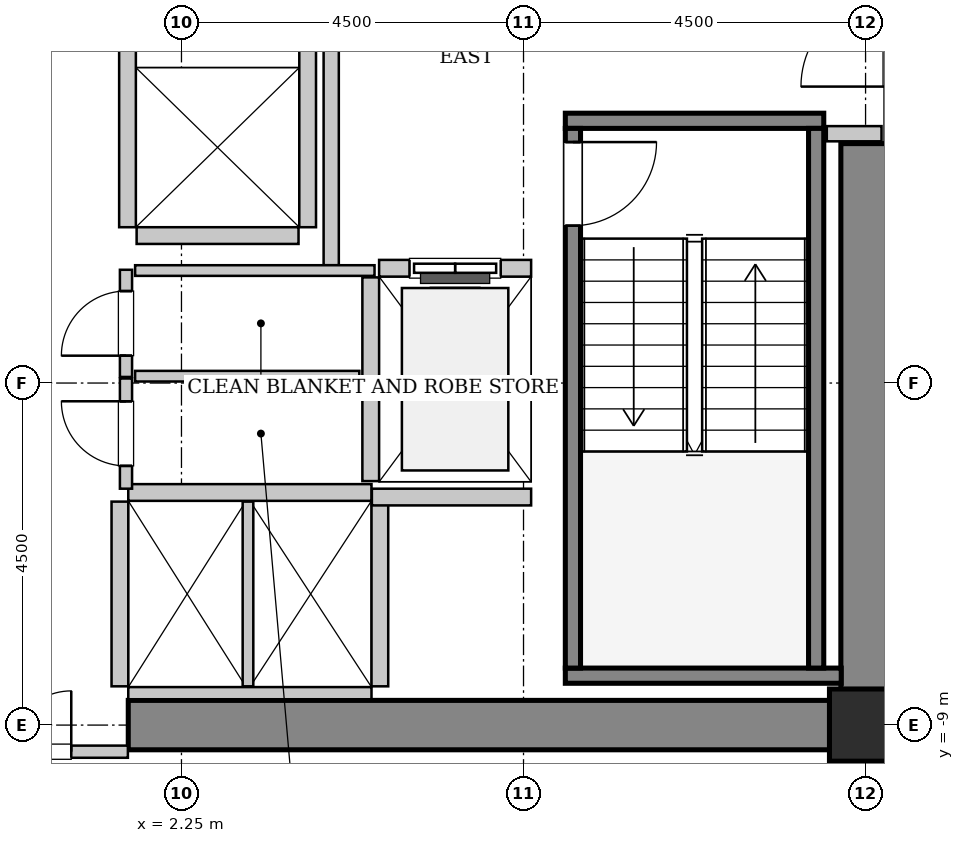
"""IFC4 building model, lengths in metres.
Left out: names, types, materials, properties, quantities, classifications, styles, units other than length and angle.
Written with IfcOpenShell. Run it as: python <this file> out.ifc"""

import sys

from ifc_helpers import new_model, si_unit, direction, frame, frame_2d, origin, origin_2d, place, context, subcontext, project, spatial, rectangle, hollow_rectangle, extrude, source, transform, mapped, element, fill, save


model = new_model("IFC4")
c1 = context("Model", 3, precision=1e-05, world=origin(), true_north=direction((0.0, 1.0)))
c2 = subcontext(c1, "Body", "Model", "MODEL_VIEW")
j1 = project(units=[si_unit("LENGTHUNIT", "METRE"), si_unit("PLANEANGLEUNIT", "RADIAN")], contexts=[c1])
p1 = place(None, origin())
s1 = spatial("IfcSite", under=j1, at=p1, CompositionType="ELEMENT")
p2 = place(p1, origin())
s2 = spatial("IfcBuilding", under=s1, at=p2, CompositionType="ELEMENT")
p3 = place(p2, frame((0.0, 0.0, 55.8)))
s3 = spatial("IfcBuildingStorey", under=s2, at=p3, CompositionType="ELEMENT", Elevation=55.8)
m1 = source(origin(), c2, "Body", "SweptSolid", [
    extrude(rectangle(XDim=10.025, YDim=0.65, at=frame_2d((5.012, 0.0))), origin(), (0.0, 0.0, 1.0), 3.8),
])
p4 = place(p3, frame((1.55, -9.0, 0.0), z_axis=(0.0, 0.0, 1.0), x_axis=(1.0, 0.0, 0.0)))
e1 = element("IfcWall", 1, at=p4, inside=s3, PredefinedType="SHEAR", context=c2, shape_type="MappedRepresentation", body=[
    mapped(m1, transform((0.0, 0.0, 0.0), x_axis=(1.0, 0.0, 0.0), y_axis=(0.0, 1.0, 0.0), z_axis=(0.0, 0.0, 1.0), scale=1.0)),
])
m2 = source(origin(), c2, "Body", "SweptSolid", [
    extrude(rectangle(XDim=7.325, YDim=0.65, at=frame_2d((3.663, 0.0))), origin(), (0.0, 0.0, 1.0), 3.8),
])
p5 = place(p3, frame((11.25, -8.675, 0.0), z_axis=(0.0, 0.0, 1.0), x_axis=(0.0, 1.0, 0.0)))
e2 = element("IfcWall", 2, at=p5, inside=s3, PredefinedType="SHEAR", context=c2, shape_type="MappedRepresentation", body=[
    mapped(m2, transform((0.0, 0.0, 0.0), x_axis=(1.0, 0.0, 0.0), y_axis=(0.0, 1.0, 0.0), z_axis=(0.0, 0.0, 1.0), scale=1.0)),
])
m3 = source(origin(), c2, "Body", "SweptSolid", [
    extrude(hollow_rectangle(XDim=0.95, YDim=0.95, WallThickness=0.045, InnerFilletRadius=0.045, OuterFilletRadius=0.09, at=origin_2d()), origin(), (0.0, 0.0, 1.0), 3.8),
])
p6 = place(p3, frame((11.25, -9.0, 0.0), z_axis=(0.0, 0.0, 1.0), x_axis=(1.0, 0.0, 0.0)))
e3 = element("IfcColumn", 3, at=p6, inside=s3, PredefinedType="COLUMN", context=c2, shape_type="MappedRepresentation", body=[
    mapped(m3, transform((0.0, 0.0, 0.0), x_axis=(1.0, 0.0, 0.0), y_axis=(0.0, 1.0, 0.0), z_axis=(0.0, 0.0, 1.0), scale=1.0)),
])
m4 = source(origin(), c2, "Body", "SweptSolid", [
    extrude(rectangle(XDim=3.4, YDim=0.2, at=frame_2d((1.7, 0.0))), origin(), (0.0, 0.0, 1.0), 3.8),
])
p7 = place(p3, frame((7.3, -1.05, 0.0), z_axis=(0.0, 0.0, 1.0), x_axis=(1.0, 0.0, 0.0)))
e4 = element("IfcWall", 4, at=p7, inside=s3, PredefinedType="SOLIDWALL", context=c2, shape_type="MappedRepresentation", body=[
    mapped(m4, transform((0.0, 0.0, 0.0), x_axis=(1.0, 0.0, 0.0), y_axis=(0.0, 1.0, 0.0), z_axis=(0.0, 0.0, 1.0), scale=1.0)),
])
m5 = source(origin(), c2, "Body", "SweptSolid", [
    extrude(rectangle(XDim=3.63, YDim=0.2, at=frame_2d((1.815, 0.0))), origin(), (0.0, 0.0, 1.0), 3.8),
])
p8 = place(p3, frame((7.3, -8.35, 0.0), z_axis=(0.0, 0.0, 1.0), x_axis=(1.0, 0.0, 0.0)))
e5 = element("IfcWall", 5, at=p8, inside=s3, PredefinedType="SOLIDWALL", context=c2, shape_type="MappedRepresentation", body=[
    mapped(m5, transform((0.0, 0.0, 0.0), x_axis=(1.0, 0.0, 0.0), y_axis=(0.0, 1.0, 0.0), z_axis=(0.0, 0.0, 1.0), scale=1.0)),
])
m6 = source(origin(), c2, "Body", "SweptSolid", [
    extrude(rectangle(XDim=7.1, YDim=0.2, at=frame_2d((3.55, 0.0))), origin(), (0.0, 0.0, 1.0), 3.8),
])
p9 = place(p3, frame((7.4, -1.15, 0.0), z_axis=(0.0, 0.0, 1.0), x_axis=(0.0, -1.0, 0.0)))
e6 = element("IfcWall", 6, at=p9, inside=s3, PredefinedType="SOLIDWALL", context=c2, shape_type="MappedRepresentation", body=[
    mapped(m6, transform((0.0, 0.0, 0.0), x_axis=(1.0, 0.0, 0.0), y_axis=(0.0, 1.0, 0.0), z_axis=(0.0, 0.0, 1.0), scale=1.0)),
])
p10 = place(p9, frame((0.18, 0.0, 0.0)))
e7 = element("IfcOpeningElement", 7, at=p10, cuts=e6, PredefinedType="OPENING", context=c2, shape_type="SweptSolid", body=[
    extrude(rectangle(XDim=1.1, YDim=2.15, at=frame_2d((0.55, 1.075))), frame((0.0, 0.11, 0.0), z_axis=(0.0, -1.0, 0.0), x_axis=(1.0, 0.0, 0.0)), (0.0, 0.0, 1.0), 0.22),
])
p11 = place(p3, frame((10.6, -1.15, 0.0), z_axis=(0.0, 0.0, 1.0), x_axis=(0.0, -1.0, 0.0)))
e8 = element("IfcWall", 8, at=p11, inside=s3, PredefinedType="SOLIDWALL", context=c2, shape_type="MappedRepresentation", body=[
    mapped(m6, transform((0.0, 0.0, 0.0), x_axis=(1.0, 0.0, 0.0), y_axis=(0.0, 1.0, 0.0), z_axis=(0.0, 0.0, 1.0), scale=1.0)),
])
m7 = source(origin(), c2, "Body", "SweptSolid", [
    extrude(rectangle(XDim=2.0, YDim=0.22, at=frame_2d((1.0, 0.0))), origin(), (0.0, 0.0, 1.0), 3.535),
])
p12 = place(p3, frame((6.85, -2.99, 0.0), z_axis=(0.0, 0.0, 1.0), x_axis=(-1.0, 0.0, 0.0)))
e9 = element("IfcWall", 9, at=p12, inside=s3, PredefinedType="SOLIDWALL", context=c2, shape_type="MappedRepresentation", body=[
    mapped(m7, transform((0.0, 0.0, 0.0), x_axis=(1.0, 0.0, 0.0), y_axis=(0.0, 1.0, 0.0), z_axis=(0.0, 0.0, 1.0), scale=1.0)),
])
p13 = place(p12, frame((0.4, 0.0, 0.0)))
e10 = element("IfcOpeningElement", 10, at=p13, cuts=e9, PredefinedType="OPENING", context=c2, shape_type="SweptSolid", body=[
    extrude(rectangle(XDim=1.2, YDim=2.2, at=frame_2d((0.6, 1.1))), frame((0.0, 0.12, 0.0), z_axis=(0.0, -1.0, 0.0), x_axis=(1.0, 0.0, 0.0)), (0.0, 0.0, 1.0), 0.24),
])
m8 = source(origin(), c2, "Body", "SweptSolid", [
    extrude(rectangle(XDim=2.68, YDim=0.22, at=frame_2d((1.34, 0.0))), origin(), (0.0, 0.0, 1.0), 3.535),
])
p14 = place(p3, frame((4.74, -3.11, 0.0), z_axis=(0.0, 0.0, 1.0), x_axis=(0.0, -1.0, 0.0)))
e11 = element("IfcWall", 11, at=p14, inside=s3, PredefinedType="SOLIDWALL", context=c2, shape_type="MappedRepresentation", body=[
    mapped(m8, transform((0.0, 0.0, 0.0), x_axis=(1.0, 0.0, 0.0), y_axis=(0.0, 1.0, 0.0), z_axis=(0.0, 0.0, 1.0), scale=1.0)),
])
m9 = source(origin(), c2, "Body", "SweptSolid", [
    extrude(rectangle(XDim=3.2, YDim=0.22, at=frame_2d((1.6, 0.0))), origin(), (0.0, 0.0, 1.0), 3.535),
])
p15 = place(p3, frame((4.75, -5.94, 0.0), z_axis=(0.0, 0.0, 1.0), x_axis=(-1.0, 0.0, 0.0)))
e12 = element("IfcWall", 12, at=p15, inside=s3, PredefinedType="SOLIDWALL", context=c2, shape_type="MappedRepresentation", body=[
    mapped(m9, transform((0.0, 0.0, 0.0), x_axis=(1.0, 0.0, 0.0), y_axis=(0.0, 1.0, 0.0), z_axis=(0.0, 0.0, 1.0), scale=1.0)),
])
m10 = source(origin(), c2, "Body", "SweptSolid", [
    extrude(rectangle(XDim=3.2, YDim=0.16, at=frame_2d((1.6, 0.0))), origin(), (0.0, 0.0, 1.0), 2.425),
])
p16 = place(p3, frame((1.55, -8.58, 0.0), z_axis=(0.0, 0.0, 1.0), x_axis=(1.0, 0.0, 0.0)))
e13 = element("IfcWall", 13, at=p16, inside=s3, PredefinedType="PARTITIONING", context=c2, shape_type="MappedRepresentation", body=[
    mapped(m10, transform((0.0, 0.0, 0.0), x_axis=(1.0, 0.0, 0.0), y_axis=(0.0, 1.0, 0.0), z_axis=(0.0, 0.0, 1.0), scale=1.0)),
])
m11 = source(origin(), c2, "Body", "SweptSolid", [
    extrude(rectangle(XDim=2.43, YDim=0.22, at=frame_2d((1.215, 0.0))), origin(), (0.0, 0.0, 1.0), 3.535),
])
p17 = place(p3, frame((1.44, -6.06, 0.0), z_axis=(0.0, 0.0, 1.0), x_axis=(0.0, -1.0, 0.0)))
e14 = element("IfcWall", 14, at=p17, inside=s3, PredefinedType="SOLIDWALL", context=c2, shape_type="MappedRepresentation", body=[
    mapped(m11, transform((0.0, 0.0, 0.0), x_axis=(1.0, 0.0, 0.0), y_axis=(0.0, 1.0, 0.0), z_axis=(0.0, 0.0, 1.0), scale=1.0)),
])
m12 = source(origin(), c2, "Body", "SweptSolid", [
    extrude(rectangle(XDim=2.43, YDim=0.14, at=frame_2d((1.215, 0.0))), origin(), (0.0, 0.0, 1.0), 3.535),
])
p18 = place(p3, frame((3.125, -8.49, 0.0), z_axis=(0.0, 0.0, 1.0), x_axis=(0.0, 1.0, 0.0)))
e15 = element("IfcWall", 15, at=p18, inside=s3, PredefinedType="PARTITIONING", context=c2, shape_type="MappedRepresentation", body=[
    mapped(m12, transform((0.0, 0.0, 0.0), x_axis=(1.0, 0.0, 0.0), y_axis=(0.0, 1.0, 0.0), z_axis=(0.0, 0.0, 1.0), scale=1.0)),
])
p19 = place(p3, frame((4.86, -8.49, 0.0), z_axis=(0.0, 0.0, 1.0), x_axis=(0.0, 1.0, 0.0)))
e16 = element("IfcWall", 16, at=p19, inside=s3, PredefinedType="SOLIDWALL", context=c2, shape_type="MappedRepresentation", body=[
    mapped(m11, transform((0.0, 0.0, 0.0), x_axis=(1.0, 0.0, 0.0), y_axis=(0.0, 1.0, 0.0), z_axis=(0.0, 0.0, 1.0), scale=1.0)),
])
m13 = source(origin(), c2, "Body", "SweptSolid", [
    extrude(rectangle(XDim=4.9, YDim=0.22, at=frame_2d((2.45, 0.0))), origin(), (0.0, 0.0, 1.0), 3.535),
])
for number, where, z_axis, x_axis in (
    (17, (1.54, 2.45, 0.0), (0.0, 0.0, 1.0), (0.0, -1.0, 0.0)),
    (18, (3.91, -2.45, 0.0), (0.0, 0.0, 1.0), (0.0, 1.0, 0.0)),
):
    element("IfcWall", number, at=place(p3, frame(where, z_axis=z_axis, x_axis=x_axis)), inside=s3, PredefinedType="SOLIDWALL", context=c2, shape_type="MappedRepresentation", body=[
        mapped(m13, transform((0.0, 0.0, 0.0), x_axis=(1.0, 0.0, 0.0), y_axis=(0.0, 1.0, 0.0), z_axis=(0.0, 0.0, 1.0), scale=1.0)),
    ])
m14 = source(origin(), c2, "Body", "SweptSolid", [
    extrude(rectangle(XDim=2.13, YDim=0.22, at=frame_2d((1.065, 0.0))), origin(), (0.0, 0.0, 1.0), 3.535),
])
p20 = place(p3, frame((1.66, -2.56, 0.0), z_axis=(0.0, 0.0, 1.0), x_axis=(1.0, 0.0, 0.0)))
e19 = element("IfcWall", 19, at=p20, inside=s3, PredefinedType="SOLIDWALL", context=c2, shape_type="MappedRepresentation", body=[
    mapped(m14, transform((0.0, 0.0, 0.0), x_axis=(1.0, 0.0, 0.0), y_axis=(0.0, 1.0, 0.0), z_axis=(0.0, 0.0, 1.0), scale=1.0)),
])
m15 = source(origin(), c2, "Body", "SweptSolid", [
    extrude(rectangle(XDim=2.095, YDim=0.22, at=frame_2d((1.048, 0.0))), origin(), (0.0, 0.0, 1.0), 3.535),
])
p21 = place(p3, frame((4.755, -6.0, 0.0), z_axis=(0.0, 0.0, 1.0), x_axis=(1.0, 0.0, 0.0)))
e20 = element("IfcWall", 20, at=p21, inside=s3, PredefinedType="SOLIDWALL", context=c2, shape_type="MappedRepresentation", body=[
    mapped(m15, transform((0.0, 0.0, 0.0), x_axis=(1.0, 0.0, 0.0), y_axis=(0.0, 1.0, 0.0), z_axis=(0.0, 0.0, 1.0), scale=1.0)),
])
m16 = source(origin(), c2, "Body", "SweptSolid", [
    extrude(rectangle(XDim=5.9, YDim=0.2, at=frame_2d((2.95, 0.0))), origin(), (0.0, 0.0, 1.0), 3.535),
])
p22 = place(p3, frame((4.22, -2.95, 0.0), z_axis=(0.0, 0.0, 1.0), x_axis=(0.0, 1.0, 0.0)))
e21 = element("IfcWall", 21, at=p22, inside=s3, PredefinedType="PARTITIONING", context=c2, shape_type="MappedRepresentation", body=[
    mapped(m16, transform((0.0, 0.0, 0.0), x_axis=(1.0, 0.0, 0.0), y_axis=(0.0, 1.0, 0.0), z_axis=(0.0, 0.0, 1.0), scale=1.0)),
])
m17 = source(origin(), c2, "Body", "SweptSolid", [
    extrude(rectangle(XDim=0.72, YDim=0.2, at=frame_2d((0.36, 0.0))), origin(), (0.0, 0.0, 1.0), 3.535),
])
p23 = place(p3, frame((10.74, -1.22, 0.0), z_axis=(0.0, 0.0, 1.0), x_axis=(1.0, 0.0, 0.0)))
e22 = element("IfcWall", 22, at=p23, inside=s3, PredefinedType="PARTITIONING", context=c2, shape_type="MappedRepresentation", body=[
    mapped(m17, transform((0.0, 0.0, 0.0), x_axis=(1.0, 0.0, 0.0), y_axis=(0.0, 1.0, 0.0), z_axis=(0.0, 0.0, 1.0), scale=1.0)),
])
m18 = source(origin(), c2, "Body", "SweptSolid", [
    extrude(rectangle(XDim=3.09, YDim=0.16, at=frame_2d((1.545, 0.0))), origin(), (0.0, 0.0, 1.0), 2.425),
])
p24 = place(p3, frame((-1.545, -9.35, 0.0), z_axis=(0.0, 0.0, 1.0), x_axis=(1.0, 0.0, 0.0)))
e23 = element("IfcWall", 23, at=p24, inside=s3, PredefinedType="PARTITIONING", context=c2, shape_type="MappedRepresentation", body=[
    mapped(m18, transform((0.0, 0.0, 0.0), x_axis=(1.0, 0.0, 0.0), y_axis=(0.0, 1.0, 0.0), z_axis=(0.0, 0.0, 1.0), scale=1.0)),
])
p25 = place(p24, frame((0.745, 0.0, 0.0)))
e24 = element("IfcOpeningElement", 24, at=p25, cuts=e23, PredefinedType="OPENING", context=c2, shape_type="SweptSolid", body=[
    extrude(rectangle(XDim=1.6, YDim=2.3, at=frame_2d((0.8, 1.15))), frame((0.0, 0.09, 0.0), z_axis=(0.0, -1.0, 0.0), x_axis=(1.0, 0.0, 0.0)), (0.0, 0.0, 1.0), 0.18),
])
m19 = source(origin(), c2, "Body", "SweptSolid", [
    extrude(rectangle(XDim=1.41, YDim=0.16, at=frame_2d((0.705, 0.0))), origin(), (0.0, 0.0, 1.0), 3.535),
])
p26 = place(p3, frame((1.52, -4.42, 0.0), z_axis=(0.0, 0.0, 1.0), x_axis=(0.0, 1.0, 0.0)))
e25 = element("IfcWall", 25, at=p26, inside=s3, PredefinedType="PARTITIONING", context=c2, shape_type="MappedRepresentation", body=[
    mapped(m19, transform((0.0, 0.0, 0.0), x_axis=(1.0, 0.0, 0.0), y_axis=(0.0, 1.0, 0.0), z_axis=(0.0, 0.0, 1.0), scale=1.0)),
])
p27 = place(p26, frame((0.28, 0.0, 0.0)))
e26 = element("IfcOpeningElement", 26, at=p27, cuts=e25, PredefinedType="OPENING", context=c2, shape_type="SweptSolid", body=[
    extrude(rectangle(XDim=0.85, YDim=2.1, at=frame_2d((0.425, 1.05))), frame((0.0, 0.09, 0.0), z_axis=(0.0, -1.0, 0.0), x_axis=(1.0, 0.0, 0.0)), (0.0, 0.0, 1.0), 0.18),
])
m20 = source(origin(), c2, "Body", "SweptSolid", [
    extrude(rectangle(XDim=3.15, YDim=0.14, at=frame_2d((1.575, 0.0))), origin(), (0.0, 0.0, 1.0), 3.535),
])
p28 = place(p3, frame((1.64, -3.02, 0.0), z_axis=(0.0, 0.0, 1.0), x_axis=(1.0, 0.0, 0.0)))
e27 = element("IfcWall", 27, at=p28, inside=s3, PredefinedType="PARTITIONING", context=c2, shape_type="MappedRepresentation", body=[
    mapped(m20, transform((0.0, 0.0, 0.0), x_axis=(1.0, 0.0, 0.0), y_axis=(0.0, 1.0, 0.0), z_axis=(0.0, 0.0, 1.0), scale=1.0)),
])
m21 = source(origin(), c2, "Body", "SweptSolid", [
    extrude(rectangle(XDim=2.95, YDim=0.14, at=frame_2d((1.475, 0.0))), origin(), (0.0, 0.0, 1.0), 3.535),
])
p29 = place(p3, frame((1.64, -4.41, 0.0), z_axis=(0.0, 0.0, 1.0), x_axis=(1.0, 0.0, 0.0)))
e28 = element("IfcWall", 28, at=p29, inside=s3, PredefinedType="PARTITIONING", context=c2, shape_type="MappedRepresentation", body=[
    mapped(m21, transform((0.0, 0.0, 0.0), x_axis=(1.0, 0.0, 0.0), y_axis=(0.0, 1.0, 0.0), z_axis=(0.0, 0.0, 1.0), scale=1.0)),
])
m22 = source(origin(), c2, "Body", "SweptSolid", [
    extrude(rectangle(XDim=1.45, YDim=0.16, at=frame_2d((0.725, 0.0))), origin(), (0.0, 0.0, 1.0), 3.535),
])
p30 = place(p3, frame((1.52, -5.89, 0.0), z_axis=(0.0, 0.0, 1.0), x_axis=(0.0, 1.0, 0.0)))
e29 = element("IfcWall", 29, at=p30, inside=s3, PredefinedType="PARTITIONING", context=c2, shape_type="MappedRepresentation", body=[
    mapped(m22, transform((0.0, 0.0, 0.0), x_axis=(1.0, 0.0, 0.0), y_axis=(0.0, 1.0, 0.0), z_axis=(0.0, 0.0, 1.0), scale=1.0)),
])
p31 = place(p30, frame((0.3, 0.0, 0.0)))
e30 = element("IfcOpeningElement", 30, at=p31, cuts=e29, PredefinedType="OPENING", context=c2, shape_type="SweptSolid", body=[
    extrude(rectangle(XDim=0.85, YDim=2.1, at=frame_2d((0.425, 1.05))), frame((0.0, 0.09, 0.0), z_axis=(0.0, -1.0, 0.0), x_axis=(1.0, 0.0, 0.0)), (0.0, 0.0, 1.0), 0.18),
])
m23 = source(origin(), c2, "Body", "SweptSolid", [
    extrude(rectangle(XDim=1.1, YDim=2.15, at=frame_2d((0.55, 1.075))), frame((0.0, 0.025, 0.0), z_axis=(0.0, -1.0, 0.0), x_axis=(1.0, 0.0, 0.0)), (0.0, 0.0, 1.0), 0.05),
])
p32 = place(p10, origin())
e31 = element("IfcDoor", 31, at=p32, inside=s3, OperationType="SINGLE_SWING_LEFT", PredefinedType="DOOR", context=c2, shape_type="MappedRepresentation", body=[
    mapped(m23, transform((0.0, 0.0, 0.0), x_axis=(1.0, 0.0, 0.0), y_axis=(0.0, 1.0, 0.0), z_axis=(0.0, 0.0, 1.0), scale=1.0)),
])
fill(e7, e31)
m24 = source(origin(), c2, "Body", "SweptSolid", [
    extrude(rectangle(XDim=1.2, YDim=2.2, at=frame_2d((0.6, 1.1))), frame((0.0, 0.025, 0.0), z_axis=(0.0, -1.0, 0.0), x_axis=(1.0, 0.0, 0.0)), (0.0, 0.0, 1.0), 0.05),
])
p33 = place(p13, origin())
e32 = element("IfcDoor", 32, at=p33, inside=s3, OperationType="SLIDING_TO_LEFT", PredefinedType="DOOR", context=c2, shape_type="MappedRepresentation", body=[
    mapped(m24, transform((0.0, 0.0, 0.0), x_axis=(1.0, 0.0, 0.0), y_axis=(0.0, 1.0, 0.0), z_axis=(0.0, 0.0, 1.0), scale=1.0)),
])
fill(e10, e32)
m25 = source(origin(), c2, "Body", "SweptSolid", [
    extrude(rectangle(XDim=1.6, YDim=2.3, at=frame_2d((0.8, 1.15))), frame((0.0, 0.025, 0.0), z_axis=(0.0, -1.0, 0.0), x_axis=(1.0, 0.0, 0.0)), (0.0, 0.0, 1.0), 0.05),
])
p34 = place(p25, origin())
e33 = element("IfcDoor", 33, at=p34, inside=s3, OperationType="DOUBLE_DOOR_SINGLE_SWING", PredefinedType="DOOR", context=c2, shape_type="MappedRepresentation", body=[
    mapped(m25, transform((0.0, 0.0, 0.0), x_axis=(1.0, 0.0, 0.0), y_axis=(0.0, 1.0, 0.0), z_axis=(0.0, 0.0, 1.0), scale=1.0)),
])
fill(e24, e33)
m26 = source(origin(), c2, "Body", "SweptSolid", [
    extrude(rectangle(XDim=0.85, YDim=2.1, at=frame_2d((0.425, 1.05))), frame((0.0, 0.025, 0.0), z_axis=(0.0, -1.0, 0.0), x_axis=(1.0, 0.0, 0.0)), (0.0, 0.0, 1.0), 0.05),
])
p35 = place(p27, origin())
e34 = element("IfcDoor", 34, at=p35, inside=s3, OperationType="SINGLE_SWING_LEFT", PredefinedType="DOOR", context=c2, shape_type="MappedRepresentation", body=[
    mapped(m26, transform((0.0, 0.0, 0.0), x_axis=(1.0, 0.0, 0.0), y_axis=(0.0, 1.0, 0.0), z_axis=(0.0, 0.0, 1.0), scale=1.0)),
])
fill(e26, e34)
p36 = place(p31, origin())
e35 = element("IfcDoor", 35, at=p36, inside=s3, OperationType="SINGLE_SWING_RIGHT", PredefinedType="DOOR", context=c2, shape_type="MappedRepresentation", body=[
    mapped(m26, transform((0.0, 0.0, 0.0), x_axis=(1.0, 0.0, 0.0), y_axis=(0.0, 1.0, 0.0), z_axis=(0.0, 0.0, 1.0), scale=1.0)),
])
fill(e30, e35)
save(model, sys.argv[1])
